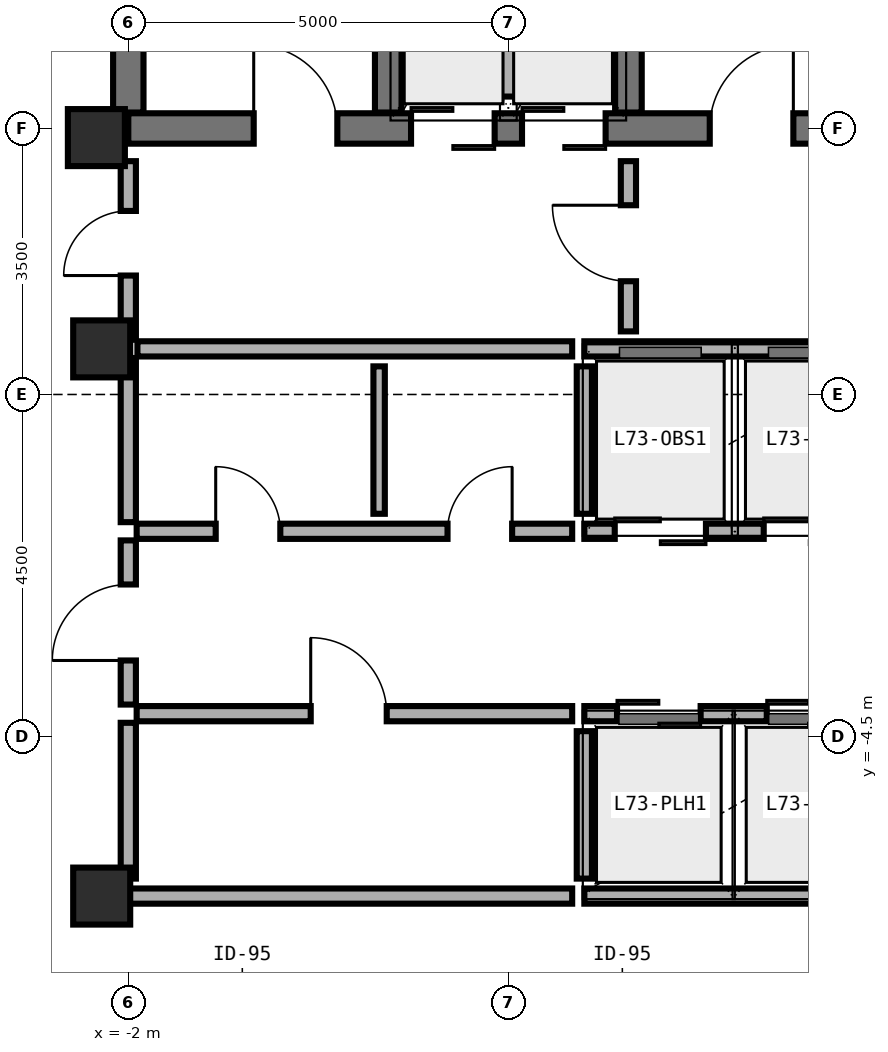
"""IFC4 building model, lengths in metres.
Left out: names, types, materials, properties, quantities, classifications, styles, units other than length and angle.
Written with IfcOpenShell. Run it as: python <this file> out.ifc"""

import sys

from ifc_helpers import new_model, si_unit, direction, frame, frame_2d, origin, origin_2d, place, context, subcontext, project, spatial, rectangle, extrude, element, fill, save


model = new_model("IFC4")
c1 = context("Model", 3, precision=1e-05, world=origin(), true_north=direction((0.0, 1.0)))
c2 = subcontext(c1, "Body", "Model", "MODEL_VIEW")
j1 = project(units=[si_unit("LENGTHUNIT", "METRE"), si_unit("PLANEANGLEUNIT", "RADIAN")], contexts=[c1])
p1 = place(None, origin())
s1 = spatial("IfcSite", under=j1, at=p1, CompositionType="ELEMENT")
p2 = place(p1, origin())
s2 = spatial("IfcBuilding", under=s1, at=p2, CompositionType="ELEMENT")
p3 = place(p2, frame((0.0, 0.0, 285.0)))
s3 = spatial("IfcBuildingStorey", under=s2, at=p3, CompositionType="ELEMENT", Elevation=285.0)
p4 = place(p3, frame((-2.0, 3.5, 0.0), z_axis=(0.0, 0.0, 1.0), x_axis=(1.0, 0.0, 0.0)))
e1 = element("IfcWall", 1, at=p4, inside=s3, PredefinedType="SHEAR", context=c2, shape_type="SweptSolid", body=[
    extrude(rectangle(XDim=10.0, YDim=0.4, at=frame_2d((5.0, 0.0))), origin(), (0.0, 0.0, 1.0), 4.492),
])
p5 = place(p4, frame((1.65, 0.0, 0.0)))
e2 = element("IfcOpeningElement", 2, at=p5, cuts=e1, PredefinedType="OPENING", context=c2, shape_type="SweptSolid", body=[
    extrude(rectangle(XDim=1.1, YDim=2.15, at=frame_2d((0.55, 1.075))), frame((0.0, 0.21, 0.0), z_axis=(0.0, -1.0, 0.0), x_axis=(1.0, 0.0, 0.0)), (0.0, 0.0, 1.0), 0.42),
])
p6 = place(p4, frame((7.65, 0.0, 0.0)))
e3 = element("IfcOpeningElement", 3, at=p6, cuts=e1, PredefinedType="OPENING", context=c2, shape_type="SweptSolid", body=[
    extrude(rectangle(XDim=1.1, YDim=2.15, at=frame_2d((0.55, 1.075))), frame((0.0, 0.21, 0.0), z_axis=(0.0, -1.0, 0.0), x_axis=(1.0, 0.0, 0.0)), (0.0, 0.0, 1.0), 0.42),
])
p7 = place(p4, frame((3.72, 0.0, 0.0)))
e4 = element("IfcOpeningElement", 4, at=p7, cuts=e1, PredefinedType="OPENING", context=c2, shape_type="SweptSolid", body=[
    extrude(rectangle(XDim=1.1, YDim=2.2, at=frame_2d((0.55, 1.1))), frame((0.0, 0.21, 0.0), z_axis=(0.0, -1.0, 0.0), x_axis=(1.0, 0.0, 0.0)), (0.0, 0.0, 1.0), 0.42),
])
p8 = place(p4, frame((5.18, 0.0, 0.0)))
e5 = element("IfcOpeningElement", 5, at=p8, cuts=e1, PredefinedType="OPENING", context=c2, shape_type="SweptSolid", body=[
    extrude(rectangle(XDim=1.1, YDim=2.2, at=frame_2d((0.55, 1.1))), frame((0.0, 0.21, 0.0), z_axis=(0.0, -1.0, 0.0), x_axis=(1.0, 0.0, 0.0)), (0.0, 0.0, 1.0), 0.42),
])
p9 = place(p3, frame((-2.0, 3.71, 0.0), z_axis=(0.0, 0.0, 1.0), x_axis=(0.0, 1.0, 0.0)))
e6 = element("IfcWall", 6, at=p9, inside=s3, PredefinedType="SHEAR", context=c2, shape_type="SweptSolid", body=[
    extrude(rectangle(XDim=8.58, YDim=0.4, at=frame_2d((4.29, 0.0))), origin(), (0.0, 0.0, 1.0), 4.492),
])
for number, where, z_axis, x_axis in (
    (7, (1.42, 3.71, 0.0), (0.0, 0.0, 1.0), (0.0, 1.0, 0.0)),
    (8, (4.58, 3.71, 0.0), (0.0, 0.0, 1.0), (0.0, 1.0, 0.0)),
):
    element("IfcWall", number, at=place(p3, frame(where, z_axis=z_axis, x_axis=x_axis)), inside=s3, PredefinedType="SHEAR", context=c2, shape_type="SweptSolid", body=[
        extrude(rectangle(XDim=8.58, YDim=0.35, at=frame_2d((4.29, 0.0))), origin(), (0.0, 0.0, 1.0), 4.492),
    ])
for number, where, z_axis, x_axis in (
    (9, (-2.42, 3.38, 0.0), (0.0, 0.0, 1.0), (1.0, 0.0, 0.0)),
    (10, (-2.35, 0.6, 0.0), (0.0, 0.0, 1.0), (1.0, 0.0, 0.0)),
    (11, (-2.35, -6.6, 0.0), (0.0, 0.0, 1.0), (1.0, 0.0, 0.0)),
):
    element("IfcColumn", number, at=place(p3, frame(where, z_axis=z_axis, x_axis=x_axis)), inside=s3, PredefinedType="COLUMN", context=c2, shape_type="SweptSolid", body=[
        extrude(rectangle(XDim=0.75, YDim=0.75, at=origin_2d()), origin(), (0.0, 0.0, 1.0), 4.475),
    ])
p10 = place(p3, frame((3.0, 3.92, 0.0), z_axis=(0.0, 0.0, 1.0), x_axis=(0.0, 1.0, 0.0)))
e12 = element("IfcWall", 12, at=p10, inside=s3, PredefinedType="SOLIDWALL", context=c2, shape_type="SweptSolid", body=[
    extrude(rectangle(XDim=2.03, YDim=0.2, at=frame_2d((1.015, 0.0))), origin(), (0.0, 0.0, 1.0), 4.08),
])
p11 = place(p3, frame((4.0, 0.6, 0.0), z_axis=(0.0, 0.0, 1.0), x_axis=(1.0, 0.0, 0.0)))
e13 = element("IfcWall", 13, at=p11, inside=s3, PredefinedType="SOLIDWALL", context=c2, shape_type="SweptSolid", body=[
    extrude(rectangle(XDim=3.88, YDim=0.2, at=frame_2d((1.94, 0.0))), origin(), (0.0, 0.0, 1.0), 3.792),
])
p12 = place(p3, frame((4.0, -1.8, 0.0), z_axis=(0.0, 0.0, 1.0), x_axis=(1.0, 0.0, 0.0)))
e14 = element("IfcWall", 14, at=p12, inside=s3, PredefinedType="SOLIDWALL", context=c2, shape_type="SweptSolid", body=[
    extrude(rectangle(XDim=4.0, YDim=0.2, at=frame_2d((2.0, 0.0))), origin(), (0.0, 0.0, 1.0), 4.08),
])
p13 = place(p12, frame((0.4, 0.0, 0.0)))
e15 = element("IfcOpeningElement", 15, at=p13, cuts=e14, PredefinedType="OPENING", context=c2, shape_type="SweptSolid", body=[
    extrude(rectangle(XDim=1.2, YDim=2.25, at=frame_2d((0.6, 1.125))), frame((0.0, 0.11, 0.0), z_axis=(0.0, -1.0, 0.0), x_axis=(1.0, 0.0, 0.0)), (0.0, 0.0, 1.0), 0.22),
])
p14 = place(p12, frame((2.36, 0.0, 0.0)))
e16 = element("IfcOpeningElement", 16, at=p14, cuts=e14, PredefinedType="OPENING", context=c2, shape_type="SweptSolid", body=[
    extrude(rectangle(XDim=1.2, YDim=2.25, at=frame_2d((0.6, 1.125))), frame((0.0, 0.11, 0.0), z_axis=(0.0, -1.0, 0.0), x_axis=(1.0, 0.0, 0.0)), (0.0, 0.0, 1.0), 0.22),
])
p15 = place(p3, frame((4.0, -1.57, 0.0), z_axis=(0.0, 0.0, 1.0), x_axis=(0.0, 1.0, 0.0)))
e17 = element("IfcWall", 17, at=p15, inside=s3, PredefinedType="SOLIDWALL", context=c2, shape_type="SweptSolid", body=[
    extrude(rectangle(XDim=1.94, YDim=0.2, at=frame_2d((0.97, 0.0))), origin(), (0.0, 0.0, 1.0), 4.08),
])
p16 = place(p3, frame((4.0, -4.2, 0.0), z_axis=(0.0, 0.0, 1.0), x_axis=(1.0, 0.0, 0.0)))
e18 = element("IfcWall", 18, at=p16, inside=s3, PredefinedType="SOLIDWALL", context=c2, shape_type="SweptSolid", body=[
    extrude(rectangle(XDim=4.0, YDim=0.2, at=frame_2d((2.0, 0.0))), origin(), (0.0, 0.0, 1.0), 4.08),
])
p17 = place(p16, frame((0.43, 0.0, 0.0)))
e19 = element("IfcOpeningElement", 19, at=p17, cuts=e18, PredefinedType="OPENING", context=c2, shape_type="SweptSolid", body=[
    extrude(rectangle(XDim=1.1, YDim=2.2, at=frame_2d((0.55, 1.1))), frame((0.0, 0.11, 0.0), z_axis=(0.0, -1.0, 0.0), x_axis=(1.0, 0.0, 0.0)), (0.0, 0.0, 1.0), 0.22),
])
p18 = place(p16, frame((2.4, 0.0, 0.0)))
e20 = element("IfcOpeningElement", 20, at=p18, cuts=e18, PredefinedType="OPENING", context=c2, shape_type="SweptSolid", body=[
    extrude(rectangle(XDim=1.1, YDim=2.2, at=frame_2d((0.55, 1.1))), frame((0.0, 0.11, 0.0), z_axis=(0.0, -1.0, 0.0), x_axis=(1.0, 0.0, 0.0)), (0.0, 0.0, 1.0), 0.22),
])
p19 = place(p3, frame((4.0, -6.6, 0.0), z_axis=(0.0, 0.0, 1.0), x_axis=(1.0, 0.0, 0.0)))
e21 = element("IfcWall", 21, at=p19, inside=s3, PredefinedType="SOLIDWALL", context=c2, shape_type="SweptSolid", body=[
    extrude(rectangle(XDim=4.0, YDim=0.2, at=frame_2d((2.0, 0.0))), origin(), (0.0, 0.0, 1.0), 3.792),
])
p20 = place(p3, frame((4.0, -6.37, 0.0), z_axis=(0.0, 0.0, 1.0), x_axis=(0.0, 1.0, 0.0)))
e22 = element("IfcWall", 22, at=p20, inside=s3, PredefinedType="SOLIDWALL", context=c2, shape_type="SweptSolid", body=[
    extrude(rectangle(XDim=1.94, YDim=0.2, at=frame_2d((0.97, 0.0))), origin(), (0.0, 0.0, 1.0), 4.08),
])
p21 = place(p3, frame((4.58, 0.83, 0.0), z_axis=(0.0, 0.0, 1.0), x_axis=(0.0, 1.0, 0.0)))
e23 = element("IfcWall", 23, at=p21, inside=s3, PredefinedType="MOVABLE", context=c2, shape_type="SweptSolid", body=[
    extrude(rectangle(XDim=2.24, YDim=0.2, at=frame_2d((1.12, 0.0))), origin(), (0.0, 0.0, 1.0), 4.08),
])
p22 = place(p21, frame((0.66, 0.0, 0.0)))
e24 = element("IfcOpeningElement", 24, at=p22, cuts=e23, PredefinedType="OPENING", context=c2, shape_type="SweptSolid", body=[
    extrude(rectangle(XDim=1.0, YDim=2.1, at=frame_2d((0.5, 1.05))), frame((0.0, 0.11, 0.0), z_axis=(0.0, -1.0, 0.0), x_axis=(1.0, 0.0, 0.0)), (0.0, 0.0, 1.0), 0.22),
])
p23 = place(p3, frame((-2.0, 0.72, 0.0), z_axis=(0.0, 0.0, 1.0), x_axis=(0.0, 1.0, 0.0)))
e25 = element("IfcWall", 25, at=p23, inside=s3, PredefinedType="MOVABLE", context=c2, shape_type="SweptSolid", body=[
    extrude(rectangle(XDim=2.35, YDim=0.2, at=frame_2d((1.175, 0.0))), origin(), (0.0, 0.0, 1.0), 3.412),
])
p24 = place(p23, frame((0.845, 0.0, 0.0)))
e26 = element("IfcOpeningElement", 26, at=p24, cuts=e25, PredefinedType="OPENING", context=c2, shape_type="SweptSolid", body=[
    extrude(rectangle(XDim=0.85, YDim=2.1, at=frame_2d((0.425, 1.05))), frame((0.0, 0.11, 0.0), z_axis=(0.0, -1.0, 0.0), x_axis=(1.0, 0.0, 0.0)), (0.0, 0.0, 1.0), 0.22),
])
p25 = place(p3, frame((-2.0, -4.08, 0.0), z_axis=(0.0, 0.0, 1.0), x_axis=(0.0, 1.0, 0.0)))
e27 = element("IfcWall", 27, at=p25, inside=s3, PredefinedType="MOVABLE", context=c2, shape_type="SweptSolid", body=[
    extrude(rectangle(XDim=2.16, YDim=0.2, at=frame_2d((1.08, 0.0))), origin(), (0.0, 0.0, 1.0), 3.792),
])
p26 = place(p25, frame((0.58, 0.0, 0.0)))
e28 = element("IfcOpeningElement", 28, at=p26, cuts=e27, PredefinedType="OPENING", context=c2, shape_type="SweptSolid", body=[
    extrude(rectangle(XDim=1.0, YDim=2.1, at=frame_2d((0.5, 1.05))), frame((0.0, 0.11, 0.0), z_axis=(0.0, -1.0, 0.0), x_axis=(1.0, 0.0, 0.0)), (0.0, 0.0, 1.0), 0.22),
])
p27 = place(p3, frame((-1.89, -1.8, 0.0), z_axis=(0.0, 0.0, 1.0), x_axis=(1.0, 0.0, 0.0)))
e29 = element("IfcWall", 29, at=p27, inside=s3, PredefinedType="MOVABLE", context=c2, shape_type="SweptSolid", body=[
    extrude(rectangle(XDim=5.73, YDim=0.2, at=frame_2d((2.865, 0.0))), origin(), (0.0, 0.0, 1.0), 4.08),
])
p28 = place(p27, frame((1.04, 0.0, 0.0)))
e30 = element("IfcOpeningElement", 30, at=p28, cuts=e29, PredefinedType="OPENING", context=c2, shape_type="SweptSolid", body=[
    extrude(rectangle(XDim=0.85, YDim=2.1, at=frame_2d((0.425, 1.05))), frame((0.0, 0.11, 0.0), z_axis=(0.0, -1.0, 0.0), x_axis=(1.0, 0.0, 0.0)), (0.0, 0.0, 1.0), 0.22),
])
p29 = place(p27, frame((4.09, 0.0, 0.0)))
e31 = element("IfcOpeningElement", 31, at=p29, cuts=e29, PredefinedType="OPENING", context=c2, shape_type="SweptSolid", body=[
    extrude(rectangle(XDim=0.85, YDim=2.1, at=frame_2d((0.425, 1.05))), frame((0.0, 0.11, 0.0), z_axis=(0.0, -1.0, 0.0), x_axis=(1.0, 0.0, 0.0)), (0.0, 0.0, 1.0), 0.22),
])
p30 = place(p3, frame((-1.89, -4.2, 0.0), z_axis=(0.0, 0.0, 1.0), x_axis=(1.0, 0.0, 0.0)))
e32 = element("IfcWall", 32, at=p30, inside=s3, PredefinedType="MOVABLE", context=c2, shape_type="SweptSolid", body=[
    extrude(rectangle(XDim=5.73, YDim=0.2, at=frame_2d((2.865, 0.0))), origin(), (0.0, 0.0, 1.0), 4.08),
])
p31 = place(p30, frame((2.29, 0.0, 0.0)))
e33 = element("IfcOpeningElement", 33, at=p31, cuts=e32, PredefinedType="OPENING", context=c2, shape_type="SweptSolid", body=[
    extrude(rectangle(XDim=1.0, YDim=2.1, at=frame_2d((0.5, 1.05))), frame((0.0, 0.11, 0.0), z_axis=(0.0, -1.0, 0.0), x_axis=(1.0, 0.0, 0.0)), (0.0, 0.0, 1.0), 0.22),
])
p32 = place(p3, frame((-1.88, 0.6, 0.0), z_axis=(0.0, 0.0, 1.0), x_axis=(1.0, 0.0, 0.0)))
e34 = element("IfcWall", 34, at=p32, inside=s3, PredefinedType="MOVABLE", context=c2, shape_type="SweptSolid", body=[
    extrude(rectangle(XDim=5.72, YDim=0.2, at=frame_2d((2.86, 0.0))), origin(), (0.0, 0.0, 1.0), 3.792),
])
p33 = place(p3, frame((1.3, -1.57, 0.0), z_axis=(0.0, 0.0, 1.0), x_axis=(0.0, 1.0, 0.0)))
e35 = element("IfcWall", 35, at=p33, inside=s3, PredefinedType="PARTITIONING", context=c2, shape_type="SweptSolid", body=[
    extrude(rectangle(XDim=1.94, YDim=0.15, at=frame_2d((0.97, 0.0))), origin(), (0.0, 0.0, 1.0), 4.08),
])
p34 = place(p3, frame((-2.0, -1.68, 0.0), z_axis=(0.0, 0.0, 1.0), x_axis=(0.0, 1.0, 0.0)))
e36 = element("IfcWall", 36, at=p34, inside=s3, PredefinedType="MOVABLE", context=c2, shape_type="SweptSolid", body=[
    extrude(rectangle(XDim=2.16, YDim=0.2, at=frame_2d((1.08, 0.0))), origin(), (0.0, 0.0, 1.0), 3.792),
])
p35 = place(p3, frame((-2.0, -6.6, 0.0), z_axis=(0.0, 0.0, 1.0), x_axis=(1.0, 0.0, 0.0)))
e37 = element("IfcWall", 37, at=p35, inside=s3, PredefinedType="MOVABLE", context=c2, shape_type="SweptSolid", body=[
    extrude(rectangle(XDim=5.84, YDim=0.2, at=frame_2d((2.92, 0.0))), origin(), (0.0, 0.0, 1.0), 3.792),
])
p36 = place(p3, frame((-2.0, -6.37, 0.0), z_axis=(0.0, 0.0, 1.0), x_axis=(0.0, 1.0, 0.0)))
e38 = element("IfcWall", 38, at=p36, inside=s3, PredefinedType="MOVABLE", context=c2, shape_type="SweptSolid", body=[
    extrude(rectangle(XDim=2.05, YDim=0.2, at=frame_2d((1.025, 0.0))), origin(), (0.0, 0.0, 1.0), 3.792),
])
p37 = place(p5, origin())
e39 = element("IfcDoor", 39, at=p37, inside=s3, OperationType="SINGLE_SWING_LEFT", PredefinedType="DOOR", context=c2, shape_type="SweptSolid", body=[
    extrude(rectangle(XDim=1.1, YDim=2.15, at=frame_2d((0.55, 1.075))), frame((0.0, 0.025, 0.0), z_axis=(0.0, -1.0, 0.0), x_axis=(1.0, 0.0, 0.0)), (0.0, 0.0, 1.0), 0.05),
])
fill(e2, e39)
p38 = place(p6, origin())
e40 = element("IfcDoor", 40, at=p38, inside=s3, OperationType="SINGLE_SWING_RIGHT", PredefinedType="DOOR", context=c2, shape_type="SweptSolid", body=[
    extrude(rectangle(XDim=1.1, YDim=2.15, at=frame_2d((0.55, 1.075))), frame((0.0, 0.025, 0.0), z_axis=(0.0, -1.0, 0.0), x_axis=(1.0, 0.0, 0.0)), (0.0, 0.0, 1.0), 0.05),
])
fill(e3, e40)
p39 = place(p7, origin())
e41 = element("IfcDoor", 41, at=p39, inside=s3, OperationType="DOUBLE_DOOR_SLIDING", PredefinedType="DOOR", context=c2, shape_type="SweptSolid", body=[
    extrude(rectangle(XDim=1.1, YDim=2.2, at=frame_2d((0.55, 1.1))), frame((0.0, 0.025, 0.0), z_axis=(0.0, -1.0, 0.0), x_axis=(1.0, 0.0, 0.0)), (0.0, 0.0, 1.0), 0.05),
])
fill(e4, e41)
p40 = place(p8, origin())
e42 = element("IfcDoor", 42, at=p40, inside=s3, OperationType="DOUBLE_DOOR_SLIDING", PredefinedType="DOOR", context=c2, shape_type="SweptSolid", body=[
    extrude(rectangle(XDim=1.1, YDim=2.2, at=frame_2d((0.55, 1.1))), frame((0.0, 0.025, 0.0), z_axis=(0.0, -1.0, 0.0), x_axis=(1.0, 0.0, 0.0)), (0.0, 0.0, 1.0), 0.05),
])
fill(e5, e42)
p41 = place(p22, origin())
e43 = element("IfcDoor", 43, at=p41, inside=s3, OperationType="SINGLE_SWING_RIGHT", PredefinedType="DOOR", context=c2, shape_type="SweptSolid", body=[
    extrude(rectangle(XDim=1.0, YDim=2.1, at=frame_2d((0.5, 1.05))), frame((0.0, 0.025, 0.0), z_axis=(0.0, -1.0, 0.0), x_axis=(1.0, 0.0, 0.0)), (0.0, 0.0, 1.0), 0.05),
])
fill(e24, e43)
p42 = place(p24, origin())
e44 = element("IfcDoor", 44, at=p42, inside=s3, OperationType="SINGLE_SWING_LEFT", PredefinedType="DOOR", context=c2, shape_type="SweptSolid", body=[
    extrude(rectangle(XDim=0.85, YDim=2.1, at=frame_2d((0.425, 1.05))), frame((0.0, 0.025, 0.0), z_axis=(0.0, -1.0, 0.0), x_axis=(1.0, 0.0, 0.0)), (0.0, 0.0, 1.0), 0.05),
])
fill(e26, e44)
p43 = place(p26, origin())
e45 = element("IfcDoor", 45, at=p43, inside=s3, OperationType="SINGLE_SWING_LEFT", PredefinedType="DOOR", context=c2, shape_type="SweptSolid", body=[
    extrude(rectangle(XDim=1.0, YDim=2.1, at=frame_2d((0.5, 1.05))), frame((0.0, 0.025, 0.0), z_axis=(0.0, -1.0, 0.0), x_axis=(1.0, 0.0, 0.0)), (0.0, 0.0, 1.0), 0.05),
])
fill(e28, e45)
p44 = place(p28, origin())
e46 = element("IfcDoor", 46, at=p44, inside=s3, OperationType="SINGLE_SWING_LEFT", PredefinedType="DOOR", context=c2, shape_type="SweptSolid", body=[
    extrude(rectangle(XDim=0.85, YDim=2.1, at=frame_2d((0.425, 1.05))), frame((0.0, 0.025, 0.0), z_axis=(0.0, -1.0, 0.0), x_axis=(1.0, 0.0, 0.0)), (0.0, 0.0, 1.0), 0.05),
])
fill(e30, e46)
p45 = place(p29, origin())
e47 = element("IfcDoor", 47, at=p45, inside=s3, OperationType="SINGLE_SWING_RIGHT", PredefinedType="DOOR", context=c2, shape_type="SweptSolid", body=[
    extrude(rectangle(XDim=0.85, YDim=2.1, at=frame_2d((0.425, 1.05))), frame((0.0, 0.025, 0.0), z_axis=(0.0, -1.0, 0.0), x_axis=(1.0, 0.0, 0.0)), (0.0, 0.0, 1.0), 0.05),
])
fill(e31, e47)
p46 = place(p31, origin())
e48 = element("IfcDoor", 48, at=p46, inside=s3, OperationType="SINGLE_SWING_LEFT", PredefinedType="DOOR", context=c2, shape_type="SweptSolid", body=[
    extrude(rectangle(XDim=1.0, YDim=2.1, at=frame_2d((0.5, 1.05))), frame((0.0, 0.025, 0.0), z_axis=(0.0, -1.0, 0.0), x_axis=(1.0, 0.0, 0.0)), (0.0, 0.0, 1.0), 0.05),
])
fill(e33, e48)
p47 = place(p13, origin())
e49 = element("IfcDoor", 49, at=p47, inside=s3, OperationType="DOUBLE_DOOR_SLIDING", PredefinedType="DOOR", context=c2, shape_type="SweptSolid", body=[
    extrude(rectangle(XDim=1.2, YDim=2.25, at=frame_2d((0.6, 1.125))), frame((0.0, 0.025, 0.0), z_axis=(0.0, -1.0, 0.0), x_axis=(1.0, 0.0, 0.0)), (0.0, 0.0, 1.0), 0.05),
])
fill(e15, e49)
p48 = place(p14, origin())
e50 = element("IfcDoor", 50, at=p48, inside=s3, OperationType="DOUBLE_DOOR_SLIDING", PredefinedType="DOOR", context=c2, shape_type="SweptSolid", body=[
    extrude(rectangle(XDim=1.2, YDim=2.25, at=frame_2d((0.6, 1.125))), frame((0.0, 0.025, 0.0), z_axis=(0.0, -1.0, 0.0), x_axis=(1.0, 0.0, 0.0)), (0.0, 0.0, 1.0), 0.05),
])
fill(e16, e50)
p49 = place(p17, origin())
e51 = element("IfcDoor", 51, at=p49, inside=s3, OperationType="DOUBLE_DOOR_SLIDING", PredefinedType="DOOR", context=c2, shape_type="SweptSolid", body=[
    extrude(rectangle(XDim=1.1, YDim=2.2, at=frame_2d((0.55, 1.1))), frame((0.0, 0.025, 0.0), z_axis=(0.0, -1.0, 0.0), x_axis=(1.0, 0.0, 0.0)), (0.0, 0.0, 1.0), 0.05),
])
fill(e19, e51)
p50 = place(p18, origin())
e52 = element("IfcDoor", 52, at=p50, inside=s3, OperationType="DOUBLE_DOOR_SLIDING", PredefinedType="DOOR", context=c2, shape_type="SweptSolid", body=[
    extrude(rectangle(XDim=1.1, YDim=2.2, at=frame_2d((0.55, 1.1))), frame((0.0, 0.025, 0.0), z_axis=(0.0, -1.0, 0.0), x_axis=(1.0, 0.0, 0.0)), (0.0, 0.0, 1.0), 0.05),
])
fill(e20, e52)
save(model, sys.argv[1])
